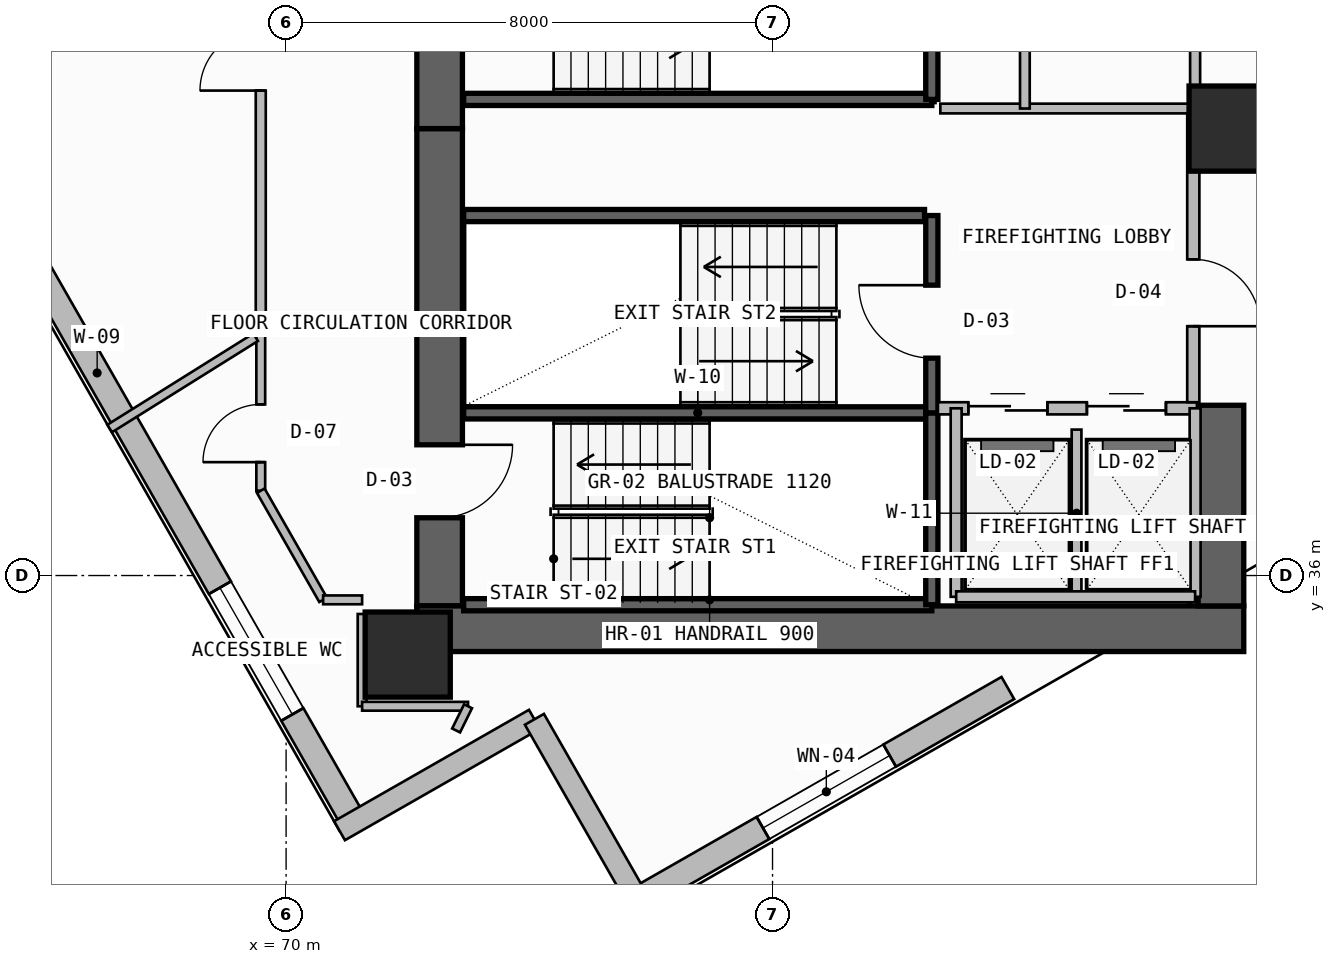
"""IFC4 building model, lengths in metres.
Left out: names, types, materials, properties, quantities, classifications, styles, units other than length and angle.
Written with IfcOpenShell. Run it as: python <this file> out.ifc"""

import sys

from ifc_helpers import new_model, si_unit, direction, frame, frame_2d, origin, origin_2d, place, context, subcontext, project, spatial, rectangle, extrude, element, fill, save


model = new_model("IFC4")
c1 = context("Model", 3, precision=1e-05, world=origin(), true_north=direction((0.0, 1.0)))
c2 = subcontext(c1, "Body", "Model", "MODEL_VIEW")
j1 = project(units=[si_unit("LENGTHUNIT", "METRE"), si_unit("PLANEANGLEUNIT", "RADIAN")], contexts=[c1])
p1 = place(None, origin())
s1 = spatial("IfcSite", under=j1, at=p1, CompositionType="ELEMENT")
p2 = place(p1, origin())
s2 = spatial("IfcBuilding", under=s1, at=p2, CompositionType="ELEMENT")
p3 = place(p2, frame((0.0, 0.0, 204.42)))
s3 = spatial("IfcBuildingStorey", under=s2, at=p3, CompositionType="ELEMENT", Elevation=204.42)
p4 = place(p3, frame((72.525, 35.5, -0.26), z_axis=(0.0, 0.0, 1.0), x_axis=(0.0, 1.0, 0.0)))
e1 = element("IfcWall", 1, at=p4, inside=s3, PredefinedType="SHEAR", context=c2, shape_type="SweptSolid", body=[
    extrude(rectangle(XDim=7.85, YDim=0.75, at=frame_2d((3.925, 0.0))), origin(), (0.0, 0.0, 1.0), 3.52),
])
p5 = place(p4, frame((1.45, 0.0, 0.26)))
e2 = element("IfcOpeningElement", 2, at=p5, cuts=e1, PredefinedType="OPENING", context=c2, shape_type="SweptSolid", body=[
    extrude(rectangle(XDim=1.2, YDim=2.2, at=frame_2d((0.6, 1.1))), frame((0.0, 0.385, 0.0), z_axis=(0.0, -1.0, 0.0), x_axis=(1.0, 0.0, 0.0)), (0.0, 0.0, 1.0), 0.77),
])
p6 = place(p3, frame((72.15, 35.125, -0.26), z_axis=(0.0, 0.0, 1.0), x_axis=(1.0, 0.0, 0.0)))
e3 = element("IfcWall", 3, at=p6, inside=s3, PredefinedType="SHEAR", context=c2, shape_type="SweptSolid", body=[
    extrude(rectangle(XDim=13.6, YDim=0.75, at=frame_2d((6.8, 0.0))), origin(), (0.0, 0.0, 1.0), 3.52),
])
p7 = place(p3, frame((85.375, 35.5, -0.26), z_axis=(0.0, 0.0, 1.0), x_axis=(0.0, 1.0, 0.0)))
e4 = element("IfcWall", 4, at=p7, inside=s3, PredefinedType="SHEAR", context=c2, shape_type="SweptSolid", body=[
    extrude(rectangle(XDim=3.3, YDim=0.75, at=frame_2d((1.65, 0.0))), origin(), (0.0, 0.0, 1.0), 3.52),
])
p8 = place(p3, frame((72.525, 43.35, -0.26), z_axis=(0.0, 0.0, 1.0), x_axis=(0.0, 1.0, 0.0)))
e5 = element("IfcWall", 5, at=p8, inside=s3, PredefinedType="SHEAR", context=c2, shape_type="SweptSolid", body=[
    extrude(rectangle(XDim=12.7, YDim=0.75, at=frame_2d((6.35, 0.0))), origin(), (0.0, 0.0, 1.0), 3.52),
])
p9 = place(p8, frame((1.35, 0.0, 0.26)))
e6 = element("IfcOpeningElement", 6, at=p9, cuts=e5, PredefinedType="OPENING", context=c2, shape_type="SweptSolid", body=[
    extrude(rectangle(XDim=1.2, YDim=2.2, at=frame_2d((0.6, 1.1))), frame((0.0, 0.385, 0.0), z_axis=(0.0, -1.0, 0.0), x_axis=(1.0, 0.0, 0.0)), (0.0, 0.0, 1.0), 0.77),
])
for number, where, z_axis, x_axis in (
    (7, (72.0, 34.7, 0.0), (0.0, 0.0, 1.0), (1.0, 0.0, 0.0)),
    (8, (85.55, 43.35, 0.0), (0.0, 0.0, 1.0), (1.0, 0.0, 0.0)),
):
    element("IfcColumn", number, at=place(p3, frame(where, z_axis=z_axis, x_axis=x_axis)), inside=s3, PredefinedType="COLUMN", context=c2, shape_type="SweptSolid", body=[
        extrude(rectangle(XDim=1.4, YDim=1.4, at=origin_2d()), origin(), (0.0, 0.0, 1.0), 3.52),
    ])
p10 = place(p3, frame((75.779, 30.669, 0.0), z_axis=(0.0, 0.0, 1.0), x_axis=(0.868213158215, 0.496191406519, 0.0)))
e9 = element("IfcWall", 9, at=p10, inside=s3, PredefinedType="SOLIDWALL", context=c2, shape_type="SweptSolid", body=[
    extrude(rectangle(XDim=7.015, YDim=0.42, at=frame_2d((3.508, 0.0))), origin(), (0.0, 0.0, 1.0), 3.26),
])
p11 = place(p10, frame((2.377, 0.0, 1.1)))
e10 = element("IfcOpeningElement", 10, at=p11, cuts=e9, PredefinedType="OPENING", context=c2, shape_type="SweptSolid", body=[
    extrude(rectangle(XDim=2.4, YDim=1.2, at=frame_2d((1.2, 0.6))), frame((0.0, 0.22, 0.0), z_axis=(0.0, -1.0, 0.0), x_axis=(1.0, 0.0, 0.0)), (0.0, 0.0, 1.0), 0.44),
])
p12 = place(p3, frame((64.874, 42.864, 0.0), z_axis=(0.0, 0.0, 1.0), x_axis=(0.49622043329, -0.868196568517, 0.0)))
e11 = element("IfcWall", 11, at=p12, inside=s3, PredefinedType="SOLIDWALL", context=c2, shape_type="SweptSolid", body=[
    extrude(rectangle(XDim=12.582, YDim=0.42, at=frame_2d((6.291, 0.0))), origin(), (0.0, 0.0, 1.0), 2.645),
])
p13 = place(p12, frame((8.136, 0.0, 1.1)))
e12 = element("IfcOpeningElement", 12, at=p13, cuts=e11, PredefinedType="OPENING", context=c2, shape_type="SweptSolid", body=[
    extrude(rectangle(XDim=2.4, YDim=1.2, at=frame_2d((1.2, 0.6))), frame((0.0, 0.22, 0.0), z_axis=(0.0, -1.0, 0.0), x_axis=(1.0, 0.0, 0.0)), (0.0, 0.0, 1.0), 0.44),
])
for number, where, z_axis, x_axis in (
    (13, (70.878, 31.803, 0.0), (0.0, 0.0, 1.0), (0.868, 0.496, 0.0)),
    (14, (74.084, 33.635, 0.0), (0.0, 0.0, 1.0), (0.496, -0.868, 0.0)),
):
    element("IfcWall", number, at=place(p3, frame(where, z_axis=z_axis, x_axis=x_axis)), inside=s3, PredefinedType="SOLIDWALL", context=c2, shape_type="SweptSolid", body=[
        extrude(rectangle(XDim=3.692, YDim=0.36, at=frame_2d((1.846, 0.0))), origin(), (0.0, 0.0, 1.0), 3.26),
    ])
for number, where, z_axis, x_axis in (
    (15, (72.92, 35.52, -0.26), (0.0, 0.0, 1.0), (1.0, 0.0, 0.0)),
    (16, (72.92, 38.675, -0.26), (0.0, 0.0, 1.0), (1.0, 0.0, 0.0)),
):
    element("IfcWall", number, at=place(p3, frame(where, z_axis=z_axis, x_axis=x_axis)), inside=s3, PredefinedType="SOLIDWALL", context=c2, shape_type="SweptSolid", body=[
        extrude(rectangle(XDim=7.7, YDim=0.2, at=frame_2d((3.85, 0.0))), origin(), (0.0, 0.0, 1.0), 3.52),
    ])
p14 = place(p3, frame((80.62, 35.52, -0.26), z_axis=(0.0, 0.0, 1.0), x_axis=(0.0, 1.0, 0.0)))
e17 = element("IfcWall", 17, at=p14, inside=s3, PredefinedType="SOLIDWALL", context=c2, shape_type="SweptSolid", body=[
    extrude(rectangle(XDim=3.155, YDim=0.2, at=frame_2d((1.578, 0.0))), origin(), (0.0, 0.0, 1.0), 3.52),
])
p15 = place(p3, frame((80.62, 38.675, -0.26), z_axis=(0.0, 0.0, 1.0), x_axis=(0.0, 1.0, 0.0)))
e18 = element("IfcWall", 18, at=p15, inside=s3, PredefinedType="SOLIDWALL", context=c2, shape_type="SweptSolid", body=[
    extrude(rectangle(XDim=3.245, YDim=0.2, at=frame_2d((1.623, 0.0))), origin(), (0.0, 0.0, 1.0), 3.52),
])
p16 = place(p15, frame((0.9, 0.0, 0.26)))
e19 = element("IfcOpeningElement", 19, at=p16, cuts=e18, PredefinedType="OPENING", context=c2, shape_type="SweptSolid", body=[
    extrude(rectangle(XDim=1.2, YDim=2.2, at=frame_2d((0.6, 1.1))), frame((0.0, 0.11, 0.0), z_axis=(0.0, -1.0, 0.0), x_axis=(1.0, 0.0, 0.0)), (0.0, 0.0, 1.0), 0.22),
])
p17 = place(p3, frame((80.72, 38.75, 0.0), z_axis=(0.0, 0.0, 1.0), x_axis=(1.0, 0.0, 0.0)))
e20 = element("IfcWall", 20, at=p17, inside=s3, PredefinedType="SOLIDWALL", context=c2, shape_type="SweptSolid", body=[
    extrude(rectangle(XDim=4.26, YDim=0.2, at=frame_2d((2.13, 0.0))), origin(), (0.0, 0.0, 1.0), 3.26),
])
p18 = place(p17, frame((0.5, 0.0, 0.0)))
e21 = element("IfcOpeningElement", 21, at=p18, cuts=e20, PredefinedType="OPENING", context=c2, shape_type="SweptSolid", body=[
    extrude(rectangle(XDim=1.3, YDim=2.3, at=frame_2d((0.65, 1.15))), frame((0.0, 0.11, 0.0), z_axis=(0.0, -1.0, 0.0), x_axis=(1.0, 0.0, 0.0)), (0.0, 0.0, 1.0), 0.22),
])
p19 = place(p17, frame((2.45, 0.0, 0.0)))
e22 = element("IfcOpeningElement", 22, at=p19, cuts=e20, PredefinedType="OPENING", context=c2, shape_type="SweptSolid", body=[
    extrude(rectangle(XDim=1.3, YDim=2.3, at=frame_2d((0.65, 1.15))), frame((0.0, 0.11, 0.0), z_axis=(0.0, -1.0, 0.0), x_axis=(1.0, 0.0, 0.0)), (0.0, 0.0, 1.0), 0.22),
])
p20 = place(p3, frame((83.0, 35.65, 0.0), z_axis=(0.0, 0.0, 1.0), x_axis=(0.0, 1.0, 0.0)))
e23 = element("IfcWall", 23, at=p20, inside=s3, PredefinedType="PLUMBINGWALL", context=c2, shape_type="SweptSolid", body=[
    extrude(rectangle(XDim=2.75, YDim=0.16, at=frame_2d((1.375, 0.0))), origin(), (0.0, 0.0, 1.0), 3.26),
])
for number, where, z_axis, x_axis in (
    (24, (84.95, 35.65, 0.0), (0.0, 0.0, 1.0), (0.0, 1.0, 0.0)),
    (25, (81.02, 35.65, 0.0), (0.0, 0.0, 1.0), (0.0, 1.0, 0.0)),
):
    element("IfcWall", number, at=place(p3, frame(where, z_axis=z_axis, x_axis=x_axis)), inside=s3, PredefinedType="SOLIDWALL", context=c2, shape_type="SweptSolid", body=[
        extrude(rectangle(XDim=3.1, YDim=0.18, at=frame_2d((1.55, 0.0))), origin(), (0.0, 0.0, 1.0), 3.26),
    ])
p21 = place(p3, frame((81.02, 35.65, 0.0), z_axis=(0.0, 0.0, 1.0), x_axis=(1.0, 0.0, 0.0)))
e26 = element("IfcWall", 26, at=p21, inside=s3, PredefinedType="SOLIDWALL", context=c2, shape_type="SweptSolid", body=[
    extrude(rectangle(XDim=3.93, YDim=0.18, at=frame_2d((1.965, 0.0))), origin(), (0.0, 0.0, 1.0), 3.26),
])
p22 = place(p3, frame((84.92, 38.85, 0.0), z_axis=(0.0, 0.0, 1.0), x_axis=(0.0, 1.0, 0.0)))
e27 = element("IfcWall", 27, at=p22, inside=s3, PredefinedType="SOLIDWALL", context=c2, shape_type="SweptSolid", body=[
    extrude(rectangle(XDim=4.83, YDim=0.2, at=frame_2d((2.415, 0.0))), origin(), (0.0, 0.0, 1.0), 3.26),
])
p23 = place(p22, frame((1.25, 0.0, 0.0)))
e28 = element("IfcOpeningElement", 28, at=p23, cuts=e27, PredefinedType="OPENING", context=c2, shape_type="SweptSolid", body=[
    extrude(rectangle(XDim=1.1, YDim=2.2, at=frame_2d((0.55, 1.1))), frame((0.0, 0.11, 0.0), z_axis=(0.0, -1.0, 0.0), x_axis=(1.0, 0.0, 0.0)), (0.0, 0.0, 1.0), 0.22),
])
p24 = place(p3, frame((72.92, 41.92, -0.26), z_axis=(0.0, 0.0, 1.0), x_axis=(1.0, 0.0, 0.0)))
e29 = element("IfcWall", 29, at=p24, inside=s3, PredefinedType="SOLIDWALL", context=c2, shape_type="SweptSolid", body=[
    extrude(rectangle(XDim=7.58, YDim=0.2, at=frame_2d((3.79, 0.0))), origin(), (0.0, 0.0, 1.0), 3.52),
])
p25 = place(p3, frame((72.92, 43.83, -0.26), z_axis=(0.0, 0.0, 1.0), x_axis=(1.0, 0.0, 0.0)))
e30 = element("IfcWall", 30, at=p25, inside=s3, PredefinedType="SOLIDWALL", context=c2, shape_type="SweptSolid", body=[
    extrude(rectangle(XDim=7.7, YDim=0.2, at=frame_2d((3.85, 0.0))), origin(), (0.0, 0.0, 1.0), 3.52),
])
p26 = place(p3, frame((80.62, 43.83, -0.26), z_axis=(0.0, 0.0, 1.0), x_axis=(0.0, 1.0, 0.0)))
e31 = element("IfcWall", 31, at=p26, inside=s3, PredefinedType="SOLIDWALL", context=c2, shape_type="SweptSolid", body=[
    extrude(rectangle(XDim=3.24, YDim=0.2, at=frame_2d((1.62, 0.0))), origin(), (0.0, 0.0, 1.0), 3.52),
])
p27 = place(p3, frame((84.95, 43.68, 0.0), z_axis=(0.0, 0.0, 1.0), x_axis=(0.0, 1.0, 0.0)))
e32 = element("IfcWall", 32, at=p27, inside=s3, PredefinedType="PLUMBINGWALL", context=c2, shape_type="SweptSolid", body=[
    extrude(rectangle(XDim=1.9, YDim=0.165, at=frame_2d((0.95, 0.0))), origin(), (0.0, 0.0, 1.0), 3.26),
])
p28 = place(p3, frame((80.76, 43.68, 0.0), z_axis=(0.0, 0.0, 1.0), x_axis=(1.0, 0.0, 0.0)))
e33 = element("IfcWall", 33, at=p28, inside=s3, PredefinedType="PLUMBINGWALL", context=c2, shape_type="SweptSolid", body=[
    extrude(rectangle(XDim=4.19, YDim=0.16, at=frame_2d((2.095, 0.0))), origin(), (0.0, 0.0, 1.0), 3.26),
])
p29 = place(p3, frame((82.15, 43.68, 0.0), z_axis=(0.0, 0.0, 1.0), x_axis=(0.0, 1.0, 0.0)))
e34 = element("IfcWall", 34, at=p29, inside=s3, PredefinedType="PLUMBINGWALL", context=c2, shape_type="SweptSolid", body=[
    extrude(rectangle(XDim=1.9, YDim=0.16, at=frame_2d((0.95, 0.0))), origin(), (0.0, 0.0, 1.0), 3.26),
])
p30 = place(p3, frame((69.583, 39.971, 0.0), z_axis=(0.0, 0.0, 1.0), x_axis=(0.0, -1.0, 0.0)))
e35 = element("IfcWall", 35, at=p30, inside=s3, PredefinedType="PARTITIONING", context=c2, shape_type="SweptSolid", body=[
    extrude(rectangle(XDim=2.576, YDim=0.145, at=frame_2d((1.288, 0.0))), origin(), (0.0, 0.0, 1.0), 3.26),
])
p31 = place(p30, frame((1.156, 0.0, 0.0)))
e36 = element("IfcOpeningElement", 36, at=p31, cuts=e35, PredefinedType="OPENING", context=c2, shape_type="SweptSolid", body=[
    extrude(rectangle(XDim=0.95, YDim=2.15, at=frame_2d((0.475, 1.075))), frame((0.0, 0.083, 0.0), z_axis=(0.0, -1.0, 0.0), x_axis=(1.0, 0.0, 0.0)), (0.0, 0.0, 1.0), 0.165),
])
p32 = place(p3, frame((69.583, 37.395, 0.0), z_axis=(0.0, 0.0, 1.0), x_axis=(0.496215240912, -0.868199536217, 0.0)))
e37 = element("IfcWall", 37, at=p32, inside=s3, PredefinedType="PARTITIONING", context=c2, shape_type="SweptSolid", body=[
    extrude(rectangle(XDim=2.067, YDim=0.145, at=frame_2d((1.034, 0.0))), origin(), (0.0, 0.0, 1.0), 3.26),
])
p33 = place(p3, frame((70.609, 35.6, 0.0), z_axis=(0.0, 0.0, 1.0), x_axis=(1.0, 0.0, 0.0)))
e38 = element("IfcWall", 38, at=p33, inside=s3, PredefinedType="PARTITIONING", context=c2, shape_type="SweptSolid", body=[
    extrude(rectangle(XDim=0.641, YDim=0.145, at=frame_2d((0.32, 0.0))), origin(), (0.0, 0.0, 1.0), 3.26),
])
p34 = place(p3, frame((67.098, 38.418, 0.0), z_axis=(0.0, 0.0, 1.0), x_axis=(0.847983769097, 0.530022195146, 0.0)))
e39 = element("IfcWall", 39, at=p34, inside=s3, PredefinedType="PARTITIONING", context=c2, shape_type="SweptSolid", body=[
    extrude(rectangle(XDim=2.831, YDim=0.145, at=frame_2d((1.416, 0.0))), origin(), (0.0, 0.0, 1.0), 3.26),
])
p35 = place(p3, frame((69.583, 48.951, 0.0), z_axis=(0.0, 0.0, 1.0), x_axis=(0.0, -1.0, 0.0)))
e40 = element("IfcWall", 40, at=p35, inside=s3, PredefinedType="PARTITIONING", context=c2, shape_type="SweptSolid", body=[
    extrude(rectangle(XDim=8.952, YDim=0.165, at=frame_2d((4.476, 0.0))), origin(), (0.0, 0.0, 1.0), 2.745),
])
p36 = place(p35, frame((3.976, 0.0, 0.0)))
e41 = element("IfcOpeningElement", 41, at=p36, cuts=e40, PredefinedType="OPENING", context=c2, shape_type="SweptSolid", body=[
    extrude(rectangle(XDim=1.0, YDim=2.2, at=frame_2d((0.5, 1.1))), frame((0.0, 0.093, 0.0), z_axis=(0.0, -1.0, 0.0), x_axis=(1.0, 0.0, 0.0)), (0.0, 0.0, 1.0), 0.185),
])
p37 = place(p3, frame((71.25, 35.367, 0.0), z_axis=(0.0, 0.0, 1.0), x_axis=(0.0, -1.0, 0.0)))
e42 = element("IfcWall", 42, at=p37, inside=s3, PredefinedType="PARTITIONING", context=c2, shape_type="SweptSolid", body=[
    extrude(rectangle(XDim=1.517, YDim=0.145, at=frame_2d((0.759, 0.0))), origin(), (0.0, 0.0, 1.0), 3.26),
])
p38 = place(p3, frame((71.25, 33.85, 0.0), z_axis=(0.0, 0.0, 1.0), x_axis=(1.0, 0.0, 0.0)))
e43 = element("IfcWall", 43, at=p38, inside=s3, PredefinedType="PARTITIONING", context=c2, shape_type="SweptSolid", body=[
    extrude(rectangle(XDim=1.742, YDim=0.145, at=frame_2d((0.871, 0.0))), origin(), (0.0, 0.0, 1.0), 3.26),
])
p39 = place(p3, frame((72.992, 33.85, 0.0), z_axis=(0.0, 0.0, 1.0), x_axis=(-0.442365234368, -0.896834990075, 0.0)))
e44 = element("IfcWall", 44, at=p39, inside=s3, PredefinedType="PARTITIONING", context=c2, shape_type="SweptSolid", body=[
    extrude(rectangle(XDim=0.444, YDim=0.145, at=frame_2d((0.222, 0.0))), origin(), (0.0, 0.0, 1.0), 3.26),
])
p40 = place(p11, origin())
e45 = element("IfcWindow", 45, at=p40, inside=s3, PartitioningType="SINGLE_PANEL", PredefinedType="WINDOW", context=c2, shape_type="SweptSolid", body=[
    extrude(rectangle(XDim=2.4, YDim=1.2, at=frame_2d((1.2, 0.6))), frame((0.0, 0.03, 0.0), z_axis=(0.0, -1.0, 0.0), x_axis=(1.0, 0.0, 0.0)), (0.0, 0.0, 1.0), 0.06),
])
fill(e10, e45)
p41 = place(p13, origin())
e46 = element("IfcWindow", 46, at=p41, inside=s3, PartitioningType="SINGLE_PANEL", PredefinedType="WINDOW", context=c2, shape_type="SweptSolid", body=[
    extrude(rectangle(XDim=2.4, YDim=1.2, at=frame_2d((1.2, 0.6))), frame((0.0, 0.03, 0.0), z_axis=(0.0, -1.0, 0.0), x_axis=(1.0, 0.0, 0.0)), (0.0, 0.0, 1.0), 0.06),
])
fill(e12, e46)
p42 = place(p5, frame((1.2, 0.0, 0.0), z_axis=(0.0, 0.0, 1.0), x_axis=(-1.0, 0.0, 0.0)))
e47 = element("IfcDoor", 47, at=p42, inside=s3, OperationType="SINGLE_SWING_LEFT", PredefinedType="USERDEFINED", context=c2, shape_type="SweptSolid", body=[
    extrude(rectangle(XDim=1.2, YDim=2.2, at=frame_2d((0.6, 1.1))), frame((0.0, 0.025, 0.0), z_axis=(0.0, -1.0, 0.0), x_axis=(1.0, 0.0, 0.0)), (0.0, 0.0, 1.0), 0.05),
])
fill(e2, e47)
p43 = place(p16, origin())
e48 = element("IfcDoor", 48, at=p43, inside=s3, OperationType="SINGLE_SWING_RIGHT", PredefinedType="USERDEFINED", context=c2, shape_type="SweptSolid", body=[
    extrude(rectangle(XDim=1.2, YDim=2.2, at=frame_2d((0.6, 1.1))), frame((0.0, 0.025, 0.0), z_axis=(0.0, -1.0, 0.0), x_axis=(1.0, 0.0, 0.0)), (0.0, 0.0, 1.0), 0.05),
])
fill(e19, e48)
p44 = place(p18, origin())
e49 = element("IfcDoor", 49, at=p44, inside=s3, OperationType="DOUBLE_DOOR_SLIDING", PredefinedType="DOOR", context=c2, shape_type="SweptSolid", body=[
    extrude(rectangle(XDim=1.3, YDim=2.3, at=frame_2d((0.65, 1.15))), frame((0.0, 0.025, 0.0), z_axis=(0.0, -1.0, 0.0), x_axis=(1.0, 0.0, 0.0)), (0.0, 0.0, 1.0), 0.05),
])
fill(e21, e49)
p45 = place(p19, origin())
e50 = element("IfcDoor", 50, at=p45, inside=s3, OperationType="DOUBLE_DOOR_SLIDING", PredefinedType="DOOR", context=c2, shape_type="SweptSolid", body=[
    extrude(rectangle(XDim=1.3, YDim=2.3, at=frame_2d((0.65, 1.15))), frame((0.0, 0.025, 0.0), z_axis=(0.0, -1.0, 0.0), x_axis=(1.0, 0.0, 0.0)), (0.0, 0.0, 1.0), 0.05),
])
fill(e22, e50)
p46 = place(p23, frame((1.1, 0.0, 0.0), z_axis=(0.0, 0.0, 1.0), x_axis=(-1.0, 0.0, 0.0)))
e51 = element("IfcDoor", 51, at=p46, inside=s3, OperationType="SINGLE_SWING_RIGHT", PredefinedType="DOOR", context=c2, shape_type="SweptSolid", body=[
    extrude(rectangle(XDim=1.1, YDim=2.2, at=frame_2d((0.55, 1.1))), frame((0.0, 0.025, 0.0), z_axis=(0.0, -1.0, 0.0), x_axis=(1.0, 0.0, 0.0)), (0.0, 0.0, 1.0), 0.05),
])
fill(e28, e51)
p47 = place(p31, frame((0.95, 0.0, 0.0), z_axis=(0.0, 0.0, 1.0), x_axis=(-1.0, 0.0, 0.0)))
e52 = element("IfcDoor", 52, at=p47, inside=s3, OperationType="SINGLE_SWING_LEFT", PredefinedType="DOOR", context=c2, shape_type="SweptSolid", body=[
    extrude(rectangle(XDim=0.95, YDim=2.15, at=frame_2d((0.475, 1.075))), frame((0.0, 0.025, 0.0), z_axis=(0.0, -1.0, 0.0), x_axis=(1.0, 0.0, 0.0)), (0.0, 0.0, 1.0), 0.05),
])
fill(e36, e52)
p48 = place(p36, frame((1.0, 0.0, 0.0), z_axis=(0.0, 0.0, 1.0), x_axis=(-1.0, 0.0, 0.0)))
e53 = element("IfcDoor", 53, at=p48, inside=s3, OperationType="SINGLE_SWING_LEFT", PredefinedType="DOOR", context=c2, shape_type="SweptSolid", body=[
    extrude(rectangle(XDim=1.0, YDim=2.2, at=frame_2d((0.5, 1.1))), frame((0.0, 0.025, 0.0), z_axis=(0.0, -1.0, 0.0), x_axis=(1.0, 0.0, 0.0)), (0.0, 0.0, 1.0), 0.05),
])
fill(e41, e53)
save(model, sys.argv[1])
